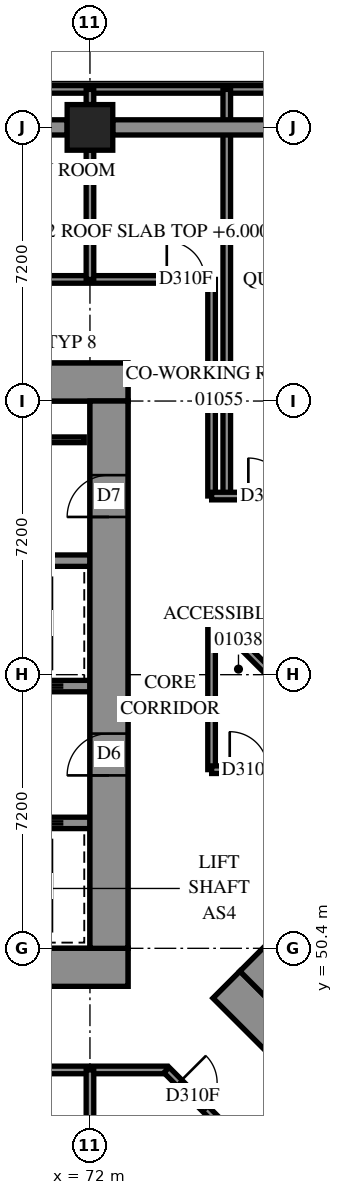
"""IFC4 building model, lengths in metres.
Left out: names, types, materials, properties, quantities, classifications, styles, units other than length and angle.
Written with IfcOpenShell. Run it as: python <this file> out.ifc"""

import sys

from ifc_helpers import new_model, si_unit, direction, frame, frame_2d, origin, origin_2d, place, context, subcontext, project, spatial, rectangle, extrude, element, fill, save


model = new_model("IFC4")
c1 = context("Model", 3, precision=1e-05, world=origin(), true_north=direction((0.0, 1.0)))
c2 = subcontext(c1, "Body", "Model", "MODEL_VIEW")
j1 = project(units=[si_unit("LENGTHUNIT", "METRE"), si_unit("PLANEANGLEUNIT", "RADIAN")], contexts=[c1])
p1 = place(None, origin())
s1 = spatial("IfcSite", under=j1, at=p1, CompositionType="ELEMENT")
p2 = place(p1, origin())
s2 = spatial("IfcBuilding", under=s1, at=p2, CompositionType="ELEMENT")
p3 = place(p2, frame((0.0, 0.0, 6.0)))
s3 = spatial("IfcBuildingStorey", under=s2, at=p3, CompositionType="ELEMENT", Elevation=6.0)
p4 = place(p3, frame((72.0, 72.0, 0.0), z_axis=(0.0, 0.0, 1.0), x_axis=(1.0, 0.0, 0.0)))
e1 = element("IfcColumn", 1, at=p4, inside=s3, PredefinedType="COLUMN", context=c2, shape_type="SweptSolid", body=[
    extrude(rectangle(XDim=1.2, YDim=1.2, at=origin_2d()), origin(), (0.0, 0.0, 1.0), 3.8),
])
p5 = place(p3, frame((56.6, 49.9, -0.4), z_axis=(0.0, 0.0, 1.0), x_axis=(1.0, 0.0, 0.0)))
e2 = element("IfcWall", 2, at=p5, inside=s3, PredefinedType="SHEAR", context=c2, shape_type="SweptSolid", body=[
    extrude(rectangle(XDim=16.4, YDim=1.0, at=frame_2d((8.2, 0.0))), origin(), (0.0, 0.0, 1.0), 3.5),
])
p6 = place(p3, frame((56.6, 65.3, -0.4), z_axis=(0.0, 0.0, 1.0), x_axis=(1.0, 0.0, 0.0)))
e3 = element("IfcWall", 3, at=p6, inside=s3, PredefinedType="SHEAR", context=c2, shape_type="SweptSolid", body=[
    extrude(rectangle(XDim=16.4, YDim=1.0, at=frame_2d((8.2, 0.0))), origin(), (0.0, 0.0, 1.0), 3.5),
])
p7 = place(p6, frame((11.0, 0.0, 0.4)))
e4 = element("IfcOpeningElement", 4, at=p7, cuts=e3, PredefinedType="OPENING", context=c2, shape_type="SweptSolid", body=[
    extrude(rectangle(XDim=0.8, YDim=2.1, at=frame_2d((0.4, 1.05))), frame((0.0, 0.51, 0.0), z_axis=(0.0, -1.0, 0.0), x_axis=(1.0, 0.0, 0.0)), (0.0, 0.0, 1.0), 1.02),
])
p8 = place(p3, frame((72.5, 50.4, -0.4), z_axis=(0.0, 0.0, 1.0), x_axis=(0.0, 1.0, 0.0)))
e5 = element("IfcWall", 5, at=p8, inside=s3, PredefinedType="SHEAR", context=c2, shape_type="SweptSolid", body=[
    extrude(rectangle(XDim=14.4, YDim=1.0, at=frame_2d((7.2, 0.0))), origin(), (0.0, 0.0, 1.0), 3.5),
])
p9 = place(p8, frame((4.55, 0.0, 0.4)))
e6 = element("IfcOpeningElement", 6, at=p9, cuts=e5, PredefinedType="OPENING", context=c2, shape_type="SweptSolid", body=[
    extrude(rectangle(XDim=1.1, YDim=2.1, at=frame_2d((0.55, 1.05))), frame((0.0, 0.51, 0.0), z_axis=(0.0, -1.0, 0.0), x_axis=(1.0, 0.0, 0.0)), (0.0, 0.0, 1.0), 1.02),
])
p10 = place(p8, frame((11.35, 0.0, 0.4)))
e7 = element("IfcOpeningElement", 7, at=p10, cuts=e5, PredefinedType="OPENING", context=c2, shape_type="SweptSolid", body=[
    extrude(rectangle(XDim=1.1, YDim=2.1, at=frame_2d((0.55, 1.05))), frame((0.0, 0.51, 0.0), z_axis=(0.0, -1.0, 0.0), x_axis=(1.0, 0.0, 0.0)), (0.0, 0.0, 1.0), 1.02),
])
p11 = place(p3, frame((57.6, 53.7, 0.0), z_axis=(0.0, 0.0, 1.0), x_axis=(1.0, 0.0, 0.0)))
e8 = element("IfcWall", 8, at=p11, inside=s3, PredefinedType="SOLIDWALL", context=c2, shape_type="SweptSolid", body=[
    extrude(rectangle(XDim=14.4, YDim=0.3, at=frame_2d((7.2, 0.0))), origin(), (0.0, 0.0, 1.0), 3.8),
])
p12 = place(p11, frame((1.25, 0.0, 0.0)))
e9 = element("IfcOpeningElement", 9, at=p12, cuts=e8, PredefinedType="OPENING", context=c2, shape_type="SweptSolid", body=[
    extrude(rectangle(XDim=1.1, YDim=2.1, at=frame_2d((0.55, 1.05))), frame((0.0, 0.16, 0.0), z_axis=(0.0, -1.0, 0.0), x_axis=(1.0, 0.0, 0.0)), (0.0, 0.0, 1.0), 0.32),
])
p13 = place(p11, frame((4.85, 0.0, 0.0)))
e10 = element("IfcOpeningElement", 10, at=p13, cuts=e8, PredefinedType="OPENING", context=c2, shape_type="SweptSolid", body=[
    extrude(rectangle(XDim=1.1, YDim=2.1, at=frame_2d((0.55, 1.05))), frame((0.0, 0.16, 0.0), z_axis=(0.0, -1.0, 0.0), x_axis=(1.0, 0.0, 0.0)), (0.0, 0.0, 1.0), 0.32),
])
p14 = place(p11, frame((8.45, 0.0, 0.0)))
e11 = element("IfcOpeningElement", 11, at=p14, cuts=e8, PredefinedType="OPENING", context=c2, shape_type="SweptSolid", body=[
    extrude(rectangle(XDim=1.1, YDim=2.1, at=frame_2d((0.55, 1.05))), frame((0.0, 0.16, 0.0), z_axis=(0.0, -1.0, 0.0), x_axis=(1.0, 0.0, 0.0)), (0.0, 0.0, 1.0), 0.32),
])
p15 = place(p11, frame((12.05, 0.0, 0.0)))
e12 = element("IfcOpeningElement", 12, at=p15, cuts=e8, PredefinedType="OPENING", context=c2, shape_type="SweptSolid", body=[
    extrude(rectangle(XDim=1.1, YDim=2.1, at=frame_2d((0.55, 1.05))), frame((0.0, 0.16, 0.0), z_axis=(0.0, -1.0, 0.0), x_axis=(1.0, 0.0, 0.0)), (0.0, 0.0, 1.0), 0.32),
])
p16 = place(p3, frame((57.6, 57.3, 0.0), z_axis=(0.0, 0.0, 1.0), x_axis=(1.0, 0.0, 0.0)))
e13 = element("IfcWall", 13, at=p16, inside=s3, PredefinedType="SOLIDWALL", context=c2, shape_type="SweptSolid", body=[
    extrude(rectangle(XDim=14.4, YDim=0.3, at=frame_2d((7.2, 0.0))), origin(), (0.0, 0.0, 1.0), 3.8),
])
p17 = place(p16, frame((12.05, 0.0, 0.0)))
e14 = element("IfcOpeningElement", 14, at=p17, cuts=e13, PredefinedType="OPENING", context=c2, shape_type="SweptSolid", body=[
    extrude(rectangle(XDim=1.1, YDim=2.1, at=frame_2d((0.55, 1.05))), frame((0.0, 0.16, 0.0), z_axis=(0.0, -1.0, 0.0), x_axis=(1.0, 0.0, 0.0)), (0.0, 0.0, 1.0), 0.32),
])
p18 = place(p3, frame((64.8, 60.6, 0.0), z_axis=(0.0, 0.0, 1.0), x_axis=(1.0, 0.0, 0.0)))
e15 = element("IfcWall", 15, at=p18, inside=s3, PredefinedType="SOLIDWALL", context=c2, shape_type="SweptSolid", body=[
    extrude(rectangle(XDim=7.2, YDim=0.3, at=frame_2d((3.6, 0.0))), origin(), (0.0, 0.0, 1.0), 3.8),
])
p19 = place(p3, frame((75.594, 49.443, -0.4), z_axis=(0.0, 0.0, 1.0), x_axis=(0.7071037324, -0.70710983, 0.0)))
e16 = element("IfcWall", 16, at=p19, inside=s3, PredefinedType="SHEAR", context=c2, shape_type="SweptSolid", body=[
    extrude(rectangle(XDim=16.4, YDim=1.0, at=frame_2d((8.2, 0.0))), origin(), (0.0, 0.0, 1.0), 3.5),
])
p20 = place(p3, frame((76.301, 49.443, -0.4), z_axis=(0.0, 0.0, 1.0), x_axis=(0.7071067812, 0.7071067812, 0.0)))
e17 = element("IfcWall", 17, at=p20, inside=s3, PredefinedType="SHEAR", context=c2, shape_type="SweptSolid", body=[
    extrude(rectangle(XDim=14.4, YDim=1.0, at=frame_2d((7.2, 0.0))), origin(), (0.0, 0.0, 1.0), 3.5),
])
p21 = place(p20, frame((4.55, 0.0, 0.4)))
e18 = element("IfcOpeningElement", 18, at=p21, cuts=e17, PredefinedType="OPENING", context=c2, shape_type="SweptSolid", body=[
    extrude(rectangle(XDim=1.1, YDim=2.1, at=frame_2d((0.55, 1.05))), frame((0.0, 0.51, 0.0), z_axis=(0.0, -1.0, 0.0), x_axis=(1.0, 0.0, 0.0)), (0.0, 0.0, 1.0), 1.02),
])
p22 = place(p20, frame((11.35, 0.0, 0.4)))
e19 = element("IfcOpeningElement", 19, at=p22, cuts=e17, PredefinedType="OPENING", context=c2, shape_type="SweptSolid", body=[
    extrude(rectangle(XDim=1.1, YDim=2.1, at=frame_2d((0.55, 1.05))), frame((0.0, 0.51, 0.0), z_axis=(0.0, -1.0, 0.0), x_axis=(1.0, 0.0, 0.0)), (0.0, 0.0, 1.0), 1.02),
])
p23 = place(p3, frame((64.95, 63.78, 0.0), z_axis=(0.0, 0.0, 1.0), x_axis=(1.0, 0.0, 0.0)))
e20 = element("IfcWall", 20, at=p23, inside=s3, PredefinedType="PARTITIONING", context=c2, shape_type="SweptSolid", body=[
    extrude(rectangle(XDim=6.9, YDim=0.15, at=frame_2d((3.45, 0.0))), origin(), (0.0, 0.0, 1.0), 3.8),
])
p24 = place(p3, frame((6.0, 73.0, 0.0), z_axis=(0.0, 0.0, 1.0), x_axis=(1.0, 0.0, 0.0)))
e21 = element("IfcWall", 21, at=p24, inside=s3, PredefinedType="PARTITIONING", context=c2, shape_type="SweptSolid", body=[
    extrude(rectangle(XDim=73.2, YDim=0.2, at=frame_2d((36.6, 0.0))), origin(), (0.0, 0.0, 1.0), 3.8),
])
p25 = place(p3, frame((54.4, 68.0, 0.0), z_axis=(0.0, 0.0, 1.0), x_axis=(1.0, 0.0, 0.0)))
e22 = element("IfcWall", 22, at=p25, inside=s3, PredefinedType="PARTITIONING", context=c2, shape_type="SweptSolid", body=[
    extrude(rectangle(XDim=20.8, YDim=0.2, at=frame_2d((10.4, 0.0))), origin(), (0.0, 0.0, 1.0), 3.8),
])
p26 = place(p25, frame((0.121, 0.0, 0.0)))
e23 = element("IfcOpeningElement", 23, at=p26, cuts=e22, PredefinedType="OPENING", context=c2, shape_type="SweptSolid", body=[
    extrude(rectangle(XDim=1.0, YDim=2.1, at=frame_2d((0.5, 1.05))), frame((0.0, 0.11, 0.0), z_axis=(0.0, -1.0, 0.0), x_axis=(1.0, 0.0, 0.0)), (0.0, 0.0, 1.0), 0.22),
])
p27 = place(p25, frame((19.622, 0.0, 0.0)))
e24 = element("IfcOpeningElement", 24, at=p27, cuts=e22, PredefinedType="OPENING", context=c2, shape_type="SweptSolid", body=[
    extrude(rectangle(XDim=1.0, YDim=2.1, at=frame_2d((0.5, 1.05))), frame((0.0, 0.11, 0.0), z_axis=(0.0, -1.0, 0.0), x_axis=(1.0, 0.0, 0.0)), (0.0, 0.0, 1.0), 0.22),
])
p28 = place(p25, frame((8.858, 0.0, 0.0)))
e25 = element("IfcOpeningElement", 25, at=p28, cuts=e22, PredefinedType="OPENING", context=c2, shape_type="SweptSolid", body=[
    extrude(rectangle(XDim=1.0, YDim=2.1, at=frame_2d((0.5, 1.05))), frame((0.0, 0.11, 0.0), z_axis=(0.0, -1.0, 0.0), x_axis=(1.0, 0.0, 0.0)), (0.0, 0.0, 1.0), 0.22),
])
p29 = place(p25, frame((14.568, 0.0, 0.0)))
e26 = element("IfcOpeningElement", 26, at=p29, cuts=e22, PredefinedType="OPENING", context=c2, shape_type="SweptSolid", body=[
    extrude(rectangle(XDim=1.0, YDim=2.1, at=frame_2d((0.5, 1.05))), frame((0.0, 0.11, 0.0), z_axis=(0.0, -1.0, 0.0), x_axis=(1.0, 0.0, 0.0)), (0.0, 0.0, 1.0), 0.22),
])
p30 = place(p3, frame((54.4, 47.2, 0.0), z_axis=(0.0, 0.0, 1.0), x_axis=(1.0, 0.0, 0.0)))
e27 = element("IfcWall", 27, at=p30, inside=s3, PredefinedType="PARTITIONING", context=c2, shape_type="SweptSolid", body=[
    extrude(rectangle(XDim=19.618, YDim=0.2, at=frame_2d((9.809, 0.0))), origin(), (0.0, 0.0, 1.0), 3.8),
])
p31 = place(p30, frame((0.178, 0.0, 0.0)))
e28 = element("IfcOpeningElement", 28, at=p31, cuts=e27, PredefinedType="OPENING", context=c2, shape_type="SweptSolid", body=[
    extrude(rectangle(XDim=1.0, YDim=2.1, at=frame_2d((0.5, 1.05))), frame((0.0, 0.11, 0.0), z_axis=(0.0, -1.0, 0.0), x_axis=(1.0, 0.0, 0.0)), (0.0, 0.0, 1.0), 0.22),
])
p32 = place(p30, frame((7.062, 0.0, 0.0)))
e29 = element("IfcOpeningElement", 29, at=p32, cuts=e27, PredefinedType="OPENING", context=c2, shape_type="SweptSolid", body=[
    extrude(rectangle(XDim=1.0, YDim=2.1, at=frame_2d((0.5, 1.05))), frame((0.0, 0.11, 0.0), z_axis=(0.0, -1.0, 0.0), x_axis=(1.0, 0.0, 0.0)), (0.0, 0.0, 1.0), 0.22),
])
p33 = place(p30, frame((14.262, 0.0, 0.0)))
e30 = element("IfcOpeningElement", 30, at=p33, cuts=e27, PredefinedType="OPENING", context=c2, shape_type="SweptSolid", body=[
    extrude(rectangle(XDim=1.0, YDim=2.1, at=frame_2d((0.5, 1.05))), frame((0.0, 0.11, 0.0), z_axis=(0.0, -1.0, 0.0), x_axis=(1.0, 0.0, 0.0)), (0.0, 0.0, 1.0), 0.22),
])
p34 = place(p3, frame((75.6, 62.3, 0.0), z_axis=(0.0, 0.0, 1.0), x_axis=(0.0, 1.0, 0.0)))
e31 = element("IfcWall", 31, at=p34, inside=s3, PredefinedType="PARTITIONING", context=c2, shape_type="SweptSolid", body=[
    extrude(rectangle(XDim=10.7, YDim=0.2, at=frame_2d((5.35, 0.0))), origin(), (0.0, 0.0, 1.0), 3.8),
])
p35 = place(p3, frame((75.2, 62.302, 0.0), z_axis=(0.0, 0.0, 1.0), x_axis=(0.0, 1.0, 0.0)))
e32 = element("IfcWall", 32, at=p35, inside=s3, PredefinedType="PARTITIONING", context=c2, shape_type="SweptSolid", body=[
    extrude(rectangle(XDim=5.698, YDim=0.2, at=frame_2d((2.849, 0.0))), origin(), (0.0, 0.0, 1.0), 3.8),
])
p36 = place(p3, frame((74.015, 47.197, 0.0), z_axis=(0.0, 0.0, 1.0), x_axis=(0.7071067812, -0.7071067812, 0.0)))
e33 = element("IfcWall", 33, at=p36, inside=s3, PredefinedType="PARTITIONING", context=c2, shape_type="SweptSolid", body=[
    extrude(rectangle(XDim=4.712, YDim=0.2, at=frame_2d((2.356, 0.0))), origin(), (0.0, 0.0, 1.0), 3.8),
])
p37 = place(p36, frame((0.468, 0.0, 0.0)))
e34 = element("IfcOpeningElement", 34, at=p37, cuts=e33, PredefinedType="OPENING", context=c2, shape_type="SweptSolid", body=[
    extrude(rectangle(XDim=1.0, YDim=2.1, at=frame_2d((0.5, 1.05))), frame((0.0, 0.11, 0.0), z_axis=(0.0, -1.0, 0.0), x_axis=(1.0, 0.0, 0.0)), (0.0, 0.0, 1.0), 0.22),
])
p38 = place(p3, frame((75.2, 55.102, 0.0), z_axis=(0.0, 0.0, 1.0), x_axis=(0.0, 1.0, 0.0)))
e35 = element("IfcWall", 35, at=p38, inside=s3, PredefinedType="PARTITIONING", context=c2, shape_type="SweptSolid", body=[
    extrude(rectangle(XDim=4.066, YDim=0.2, at=frame_2d((2.033, 0.0))), origin(), (0.0, 0.0, 1.0), 3.8),
])
p39 = place(p3, frame((75.202, 62.3, 0.0), z_axis=(0.0, 0.0, 1.0), x_axis=(1.0, 0.0, 0.0)))
e36 = element("IfcWall", 36, at=p39, inside=s3, PredefinedType="PARTITIONING", context=c2, shape_type="SweptSolid", body=[
    extrude(rectangle(XDim=3.998, YDim=0.2, at=frame_2d((1.999, 0.0))), origin(), (0.0, 0.0, 1.0), 3.8),
])
p40 = place(p39, frame((0.966, 0.0, 0.0)))
e37 = element("IfcOpeningElement", 37, at=p40, cuts=e36, PredefinedType="OPENING", context=c2, shape_type="SweptSolid", body=[
    extrude(rectangle(XDim=1.0, YDim=2.1, at=frame_2d((0.5, 1.05))), frame((0.0, 0.11, 0.0), z_axis=(0.0, -1.0, 0.0), x_axis=(1.0, 0.0, 0.0)), (0.0, 0.0, 1.0), 0.22),
])
for number, where, z_axis, x_axis in (
    (38, (72.0, 43.8, 0.0), (0.0, 0.0, 1.0), (0.0, 1.0, 0.0)),
    (39, (72.0, 68.0, 0.0), (0.0, 0.0, 1.0), (0.0, 1.0, 0.0)),
):
    element("IfcWall", number, at=place(p3, frame(where, z_axis=z_axis, x_axis=x_axis)), inside=s3, PredefinedType="PARTITIONING", context=c2, shape_type="SweptSolid", body=[
        extrude(rectangle(XDim=3.4, YDim=0.2, at=frame_2d((1.7, 0.0))), origin(), (0.0, 0.0, 1.0), 3.8),
    ])
p41 = place(p3, frame((75.202, 55.1, 0.0), z_axis=(0.0, 0.0, 1.0), x_axis=(1.0, 0.0, 0.0)))
e40 = element("IfcWall", 40, at=p41, inside=s3, PredefinedType="PARTITIONING", context=c2, shape_type="SweptSolid", body=[
    extrude(rectangle(XDim=2.936, YDim=0.2, at=frame_2d((1.468, 0.0))), origin(), (0.0, 0.0, 1.0), 3.8),
])
p42 = place(p41, frame((0.475, 0.0, 0.0)))
e41 = element("IfcOpeningElement", 41, at=p42, cuts=e40, PredefinedType="OPENING", context=c2, shape_type="SweptSolid", body=[
    extrude(rectangle(XDim=1.0, YDim=2.1, at=frame_2d((0.5, 1.05))), frame((0.0, 0.11, 0.0), z_axis=(0.0, -1.0, 0.0), x_axis=(1.0, 0.0, 0.0)), (0.0, 0.0, 1.0), 0.22),
])
p43 = place(p3, frame((75.879, 58.497, 0.0), z_axis=(0.0, 0.0, 1.0), x_axis=(0.7075866635, -0.706626573, 0.0)))
e42 = element("IfcWall", 42, at=p43, inside=s3, PredefinedType="PARTITIONING", context=c2, shape_type="SweptSolid", body=[
    extrude(rectangle(XDim=2.083, YDim=0.2, at=frame_2d((1.042, 0.0))), origin(), (0.0, 0.0, 1.0), 3.8),
])
p44 = place(p3, frame((75.397, 58.967, 0.0), z_axis=(0.0, 0.0, 1.0), x_axis=(0.7071067812, -0.7071067812, 0.0)))
e43 = element("IfcWall", 43, at=p44, inside=s3, PredefinedType="PARTITIONING", context=c2, shape_type="SweptSolid", body=[
    extrude(rectangle(XDim=0.673, YDim=0.2, at=frame_2d((0.337, 0.0))), origin(), (0.0, 0.0, 1.0), 3.8),
])
p45 = place(p3, frame((72.0, 72.6, 0.0), z_axis=(0.0, 0.0, 1.0), x_axis=(0.0, 1.0, 0.0)))
e44 = element("IfcWall", 44, at=p45, inside=s3, PredefinedType="PARTITIONING", context=c2, shape_type="SweptSolid", body=[
    extrude(rectangle(XDim=0.4, YDim=0.2, at=frame_2d((0.2, 0.0))), origin(), (0.0, 0.0, 1.0), 3.8),
])
p46 = place(p9, origin())
e45 = element("IfcDoor", 45, at=p46, inside=s3, OperationType="DOUBLE_DOOR_SINGLE_SWING", PredefinedType="DOOR", context=c2, shape_type="SweptSolid", body=[
    extrude(rectangle(XDim=1.1, YDim=2.1, at=frame_2d((0.55, 1.05))), frame((0.0, 0.025, 0.0), z_axis=(0.0, -1.0, 0.0), x_axis=(1.0, 0.0, 0.0)), (0.0, 0.0, 1.0), 0.05),
])
fill(e6, e45)
p47 = place(p10, origin())
e46 = element("IfcDoor", 46, at=p47, inside=s3, OperationType="SINGLE_SWING_RIGHT", PredefinedType="DOOR", context=c2, shape_type="SweptSolid", body=[
    extrude(rectangle(XDim=1.1, YDim=2.1, at=frame_2d((0.55, 1.05))), frame((0.0, 0.025, 0.0), z_axis=(0.0, -1.0, 0.0), x_axis=(1.0, 0.0, 0.0)), (0.0, 0.0, 1.0), 0.05),
])
fill(e7, e46)
p48 = place(p37, origin())
e47 = element("IfcDoor", 47, at=p48, inside=s3, OperationType="SINGLE_SWING_LEFT", PredefinedType="DOOR", context=c2, shape_type="SweptSolid", body=[
    extrude(rectangle(XDim=1.0, YDim=2.1, at=frame_2d((0.5, 1.05))), frame((0.0, 0.025, 0.0), z_axis=(0.0, -1.0, 0.0), x_axis=(1.0, 0.0, 0.0)), (0.0, 0.0, 1.0), 0.05),
])
fill(e34, e47)
p49 = place(p42, origin())
e48 = element("IfcDoor", 48, at=p49, inside=s3, OperationType="SINGLE_SWING_LEFT", PredefinedType="DOOR", context=c2, shape_type="SweptSolid", body=[
    extrude(rectangle(XDim=1.0, YDim=2.1, at=frame_2d((0.5, 1.05))), frame((0.0, 0.025, 0.0), z_axis=(0.0, -1.0, 0.0), x_axis=(1.0, 0.0, 0.0)), (0.0, 0.0, 1.0), 0.05),
])
fill(e41, e48)
p50 = place(p27, origin())
e49 = element("IfcDoor", 49, at=p50, inside=s3, OperationType="SINGLE_SWING_RIGHT", PredefinedType="DOOR", context=c2, shape_type="SweptSolid", body=[
    extrude(rectangle(XDim=1.0, YDim=2.1, at=frame_2d((0.5, 1.05))), frame((0.0, 0.025, 0.0), z_axis=(0.0, -1.0, 0.0), x_axis=(1.0, 0.0, 0.0)), (0.0, 0.0, 1.0), 0.05),
])
fill(e24, e49)
p51 = place(p40, origin())
e50 = element("IfcDoor", 50, at=p51, inside=s3, OperationType="SINGLE_SWING_LEFT", PredefinedType="DOOR", context=c2, shape_type="SweptSolid", body=[
    extrude(rectangle(XDim=1.0, YDim=2.1, at=frame_2d((0.5, 1.05))), frame((0.0, 0.025, 0.0), z_axis=(0.0, -1.0, 0.0), x_axis=(1.0, 0.0, 0.0)), (0.0, 0.0, 1.0), 0.05),
])
fill(e37, e50)
save(model, sys.argv[1])
